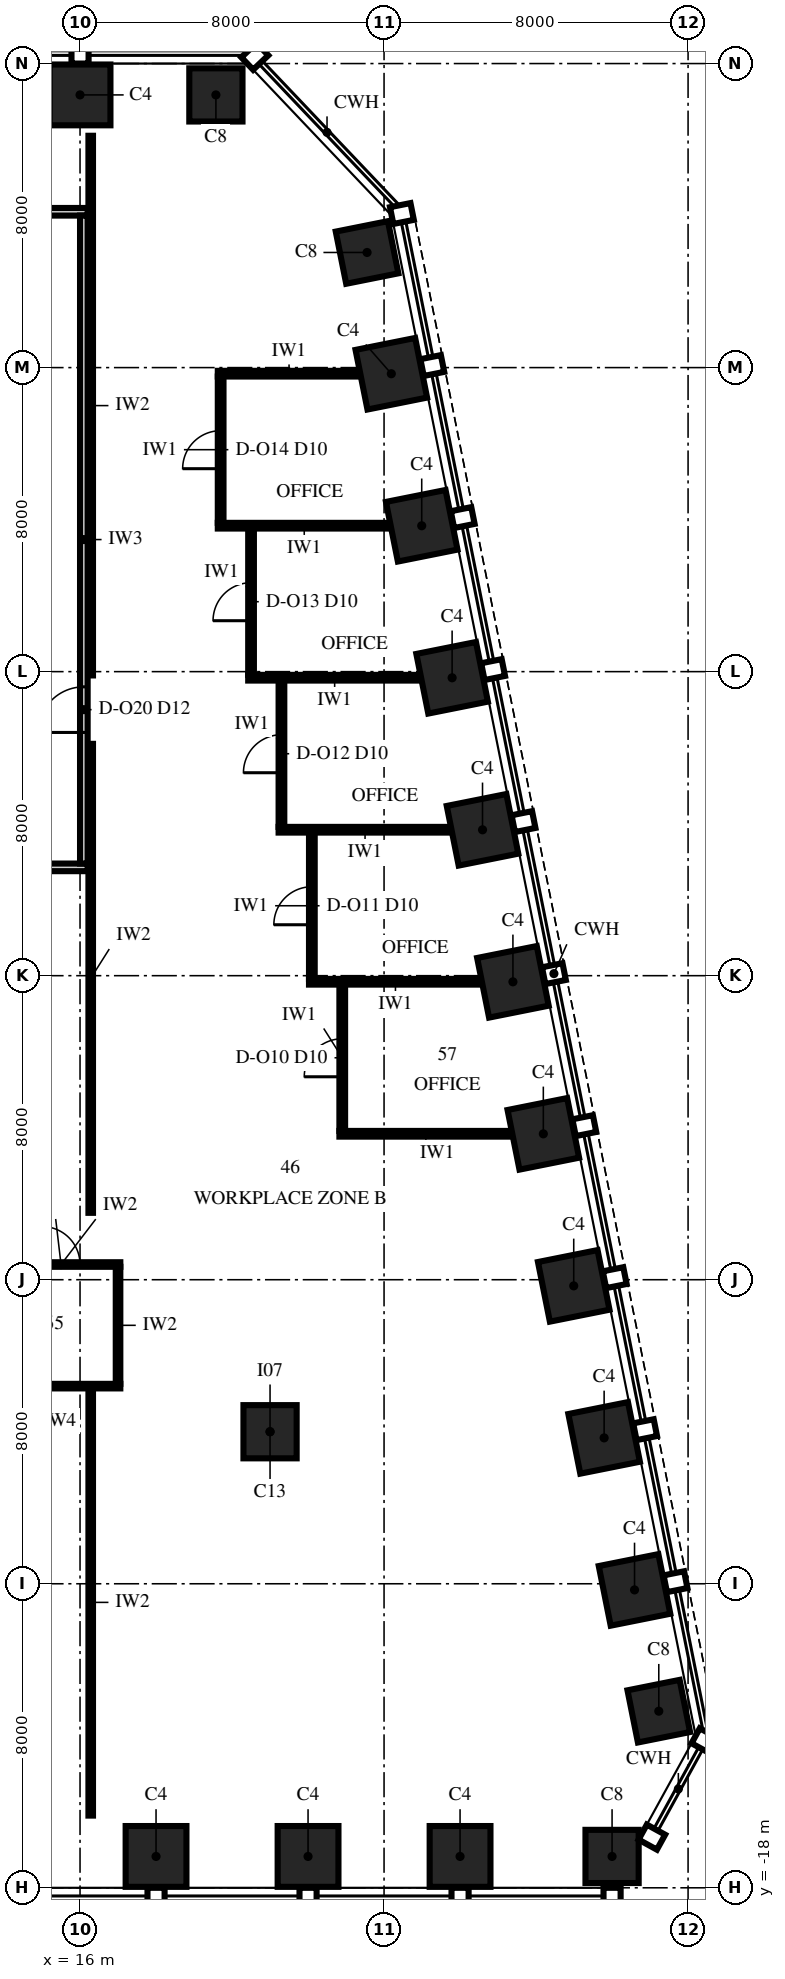
"""IFC4 building model, lengths in metres.
Left out: names, types, materials, properties, quantities, classifications, styles, units other than length and angle.
Written with IfcOpenShell. Run it as: python <this file> out.ifc"""

import sys

from ifc_helpers import new_model, si_unit, direction, frame, frame_2d, origin, origin_2d, place, context, subcontext, project, spatial, rectangle, extrude, element, fill, save


model = new_model("IFC4")
c1 = context("Model", 3, precision=1e-05, world=origin(), true_north=direction((0.0, 1.0)))
c2 = subcontext(c1, "Body", "Model", "MODEL_VIEW")
j1 = project(units=[si_unit("LENGTHUNIT", "METRE"), si_unit("PLANEANGLEUNIT", "RADIAN")], contexts=[c1])
p1 = place(None, origin())
s1 = spatial("IfcSite", under=j1, at=p1, CompositionType="ELEMENT")
p2 = place(p1, origin())
s2 = spatial("IfcBuilding", under=s1, at=p2, CompositionType="ELEMENT")
p3 = place(p2, frame((0.0, 0.0, 190.0)))
s3 = spatial("IfcBuildingStorey", under=s2, at=p3, CompositionType="ELEMENT", Elevation=190.0)
for number, where, z_axis, x_axis in (
    (1, (18.0, -17.175, 0.0), (0.0, 0.0, 1.0), (1.0, 0.0, 0.0)),
    (2, (22.0, -17.175, 0.0), (0.0, 0.0, 1.0), (1.0, 0.0, 0.0)),
    (3, (26.0, -17.175, 0.0), (0.0, 0.0, 1.0), (1.0, 0.0, 0.0)),
):
    element("IfcColumn", number, at=place(p3, frame(where, z_axis=z_axis, x_axis=x_axis)), inside=s3, PredefinedType="COLUMN", context=c2, shape_type="SweptSolid", body=[
        extrude(rectangle(XDim=1.6, YDim=1.6, at=origin_2d()), origin(), (0.0, 0.0, 1.0), 4.0),
    ])
for number, where, z_axis, x_axis in (
    (4, (30.0, -17.175, 0.0), (0.0, 0.0, 1.0), (1.0, 0.0, 0.0)),
    (5, (31.229, -13.353, 0.0), (0.0, 0.0, 1.0), (-0.196, 0.981, 0.0)),
):
    element("IfcColumn", number, at=place(p3, frame(where, z_axis=z_axis, x_axis=x_axis)), inside=s3, PredefinedType="COLUMN", context=c2, shape_type="SweptSolid", body=[
        extrude(rectangle(XDim=1.4, YDim=1.4, at=origin_2d()), origin(), (0.0, 0.0, 1.0), 4.0),
    ])
for number, where, z_axis, x_axis in (
    (6, (30.591, -10.162, 0.0), (0.0, 0.0, 1.0), (-0.196, 0.981, 0.0)),
    (7, (29.791, -6.162, 0.0), (0.0, 0.0, 1.0), (-0.196, 0.981, 0.0)),
    (8, (28.991, -2.162, 0.0), (0.0, 0.0, 1.0), (-0.196, 0.981, 0.0)),
    (9, (28.191, 1.838, 0.0), (0.0, 0.0, 1.0), (-0.196, 0.981, 0.0)),
    (10, (27.391, 5.838, 0.0), (0.0, 0.0, 1.0), (-0.196, 0.981, 0.0)),
    (11, (26.591, 9.838, 0.0), (0.0, 0.0, 1.0), (-0.196, 0.981, 0.0)),
    (12, (25.791, 13.838, 0.0), (0.0, 0.0, 1.0), (-0.196, 0.981, 0.0)),
    (13, (24.991, 17.838, 0.0), (0.0, 0.0, 1.0), (-0.196, 0.981, 0.0)),
    (14, (24.191, 21.838, 0.0), (0.0, 0.0, 1.0), (-0.196, 0.981, 0.0)),
):
    element("IfcColumn", number, at=place(p3, frame(where, z_axis=z_axis, x_axis=x_axis)), inside=s3, PredefinedType="COLUMN", context=c2, shape_type="SweptSolid", body=[
        extrude(rectangle(XDim=1.6, YDim=1.6, at=origin_2d()), origin(), (0.0, 0.0, 1.0), 4.0),
    ])
for number, where, z_axis, x_axis in (
    (15, (23.553, 25.029, 0.0), (0.0, 0.0, 1.0), (-0.196, 0.981, 0.0)),
    (16, (19.575, 29.175, 0.0), (0.0, 0.0, 1.0), (-1.0, 0.0, 0.0)),
):
    element("IfcColumn", number, at=place(p3, frame(where, z_axis=z_axis, x_axis=x_axis)), inside=s3, PredefinedType="COLUMN", context=c2, shape_type="SweptSolid", body=[
        extrude(rectangle(XDim=1.4, YDim=1.4, at=origin_2d()), origin(), (0.0, 0.0, 1.0), 4.0),
    ])
p4 = place(p3, frame((16.0, 29.175, 0.0), z_axis=(0.0, 0.0, 1.0), x_axis=(-1.0, 0.0, 0.0)))
e17 = element("IfcColumn", 17, at=p4, inside=s3, PredefinedType="COLUMN", context=c2, shape_type="SweptSolid", body=[
    extrude(rectangle(XDim=1.6, YDim=1.6, at=origin_2d()), origin(), (0.0, 0.0, 1.0), 4.0),
])
p5 = place(p3, frame((21.0, -6.0, 0.0), z_axis=(0.0, 0.0, 1.0), x_axis=(1.0, 0.0, 0.0)))
e18 = element("IfcColumn", 18, at=p5, inside=s3, PredefinedType="COLUMN", context=c2, shape_type="SweptSolid", body=[
    extrude(rectangle(XDim=1.4, YDim=1.4, at=origin_2d()), origin(), (0.0, 0.0, 1.0), 4.0),
])
p6 = place(p3, frame((1.94, -4.8, 0.0), z_axis=(0.0, 0.0, 1.0), x_axis=(1.0, 0.0, 0.0)))
e19 = element("IfcWall", 19, at=p6, inside=s3, PredefinedType="PARTITIONING", context=c2, shape_type="SweptSolid", body=[
    extrude(rectangle(XDim=15.12, YDim=0.12, at=frame_2d((7.56, 0.0))), origin(), (0.0, 0.0, 1.0), 3.25),
])
p7 = place(p3, frame((13.94, -1.6, 0.0), z_axis=(0.0, 0.0, 1.0), x_axis=(1.0, 0.0, 0.0)))
e20 = element("IfcWall", 20, at=p7, inside=s3, PredefinedType="PARTITIONING", context=c2, shape_type="SweptSolid", body=[
    extrude(rectangle(XDim=3.12, YDim=0.12, at=frame_2d((1.56, 0.0))), origin(), (0.0, 0.0, 1.0), 3.25),
])
p8 = place(p7, frame((1.06, 0.0, 0.0)))
e21 = element("IfcOpeningElement", 21, at=p8, cuts=e20, PredefinedType="OPENING", context=c2, shape_type="SweptSolid", body=[
    extrude(rectangle(XDim=1.0, YDim=2.4, at=frame_2d((0.5, 1.2))), frame((0.0, 0.075, 0.0), z_axis=(0.0, -1.0, 0.0), x_axis=(1.0, 0.0, 0.0)), (0.0, 0.0, 1.0), 0.15),
])
p9 = place(p3, frame((22.825, 1.84, 0.0), z_axis=(0.0, 0.0, 1.0), x_axis=(1.0, 0.0, 0.0)))
e22 = element("IfcWall", 22, at=p9, inside=s3, PredefinedType="PARTITIONING", context=c2, shape_type="SweptSolid", body=[
    extrude(rectangle(XDim=4.55, YDim=0.15, at=frame_2d((2.275, 0.0))), origin(), (0.0, 0.0, 1.0), 3.25),
])
p10 = place(p3, frame((22.025, 5.84, 0.0), z_axis=(0.0, 0.0, 1.0), x_axis=(1.0, 0.0, 0.0)))
e23 = element("IfcWall", 23, at=p10, inside=s3, PredefinedType="PARTITIONING", context=c2, shape_type="SweptSolid", body=[
    extrude(rectangle(XDim=4.55, YDim=0.15, at=frame_2d((2.275, 0.0))), origin(), (0.0, 0.0, 1.0), 2.842),
])
p11 = place(p3, frame((14.18, 8.85, 0.0), z_axis=(0.0, 0.0, 1.0), x_axis=(1.0, 0.0, 0.0)))
e24 = element("IfcWall", 24, at=p11, inside=s3, PredefinedType="PARTITIONING", context=c2, shape_type="SweptSolid", body=[
    extrude(rectangle(XDim=2.02, YDim=0.2, at=frame_2d((1.01, 0.0))), origin(), (0.0, 0.0, 1.0), 3.85),
])
for number, where, z_axis, x_axis in (
    (25, (21.225, 9.84, 0.0), (0.0, 0.0, 1.0), (1.0, 0.0, 0.0)),
    (26, (20.425, 13.84, 0.0), (0.0, 0.0, 1.0), (1.0, 0.0, 0.0)),
    (27, (19.625, 17.84, 0.0), (0.0, 0.0, 1.0), (1.0, 0.0, 0.0)),
):
    element("IfcWall", number, at=place(p3, frame(where, z_axis=z_axis, x_axis=x_axis)), inside=s3, PredefinedType="PARTITIONING", context=c2, shape_type="SweptSolid", body=[
        extrude(rectangle(XDim=4.55, YDim=0.15, at=frame_2d((2.275, 0.0))), origin(), (0.0, 0.0, 1.0), 3.25),
    ])
p12 = place(p3, frame((19.625, 21.84, 0.0), z_axis=(0.0, 0.0, 1.0), x_axis=(1.0, 0.0, 0.0)))
e28 = element("IfcWall", 28, at=p12, inside=s3, PredefinedType="PARTITIONING", context=c2, shape_type="SweptSolid", body=[
    extrude(rectangle(XDim=3.75, YDim=0.15, at=frame_2d((1.875, 0.0))), origin(), (0.0, 0.0, 1.0), 3.25),
])
p13 = place(p3, frame((-16.2, 26.1, 0.0), z_axis=(0.0, 0.0, 1.0), x_axis=(1.0, 0.0, 0.0)))
e29 = element("IfcWall", 29, at=p13, inside=s3, PredefinedType="PARTITIONING", context=c2, shape_type="SweptSolid", body=[
    extrude(rectangle(XDim=32.4, YDim=0.2, at=frame_2d((16.2, 0.0))), origin(), (0.0, 0.0, 1.0), 3.4),
])
p14 = place(p3, frame((16.1, 8.95, 0.0), z_axis=(0.0, 0.0, 1.0), x_axis=(0.0, 1.0, 0.0)))
e30 = element("IfcWall", 30, at=p14, inside=s3, PredefinedType="PARTITIONING", context=c2, shape_type="SweptSolid", body=[
    extrude(rectangle(XDim=17.05, YDim=0.2, at=frame_2d((8.525, 0.0))), origin(), (0.0, 0.0, 1.0), 3.25),
])
p15 = place(p14, frame((3.45, 0.0, 0.0)))
e31 = element("IfcOpeningElement", 31, at=p15, cuts=e30, PredefinedType="OPENING", context=c2, shape_type="SweptSolid", body=[
    extrude(rectangle(XDim=1.2, YDim=2.4, at=frame_2d((0.6, 1.2))), frame((0.0, 0.115, 0.0), z_axis=(0.0, -1.0, 0.0), x_axis=(1.0, 0.0, 0.0)), (0.0, 0.0, 1.0), 0.23),
])
p16 = place(p3, frame((17.0, -4.74, 0.0), z_axis=(0.0, 0.0, 1.0), x_axis=(0.0, 1.0, 0.0)))
e32 = element("IfcWall", 32, at=p16, inside=s3, PredefinedType="PARTITIONING", context=c2, shape_type="SweptSolid", body=[
    extrude(rectangle(XDim=3.08, YDim=0.12, at=frame_2d((1.54, 0.0))), origin(), (0.0, 0.0, 1.0), 3.85),
])
p17 = place(p3, frame((19.7, 17.915, 0.0), z_axis=(0.0, 0.0, 1.0), x_axis=(0.0, 1.0, 0.0)))
e33 = element("IfcWall", 33, at=p17, inside=s3, PredefinedType="PARTITIONING", context=c2, shape_type="SweptSolid", body=[
    extrude(rectangle(XDim=3.85, YDim=0.15, at=frame_2d((1.925, 0.0))), origin(), (0.0, 0.0, 1.0), 3.25),
])
p18 = place(p17, frame((1.425, 0.0, 0.0)))
e34 = element("IfcOpeningElement", 34, at=p18, cuts=e33, PredefinedType="OPENING", context=c2, shape_type="SweptSolid", body=[
    extrude(rectangle(XDim=1.0, YDim=2.3, at=frame_2d((0.5, 1.15))), frame((0.0, 0.09, 0.0), z_axis=(0.0, -1.0, 0.0), x_axis=(1.0, 0.0, 0.0)), (0.0, 0.0, 1.0), 0.18),
])
p19 = place(p3, frame((20.5, 13.915, 0.0), z_axis=(0.0, 0.0, 1.0), x_axis=(0.0, 1.0, 0.0)))
e35 = element("IfcWall", 35, at=p19, inside=s3, PredefinedType="PARTITIONING", context=c2, shape_type="SweptSolid", body=[
    extrude(rectangle(XDim=3.85, YDim=0.15, at=frame_2d((1.925, 0.0))), origin(), (0.0, 0.0, 1.0), 3.25),
])
p20 = place(p19, frame((1.425, 0.0, 0.0)))
e36 = element("IfcOpeningElement", 36, at=p20, cuts=e35, PredefinedType="OPENING", context=c2, shape_type="SweptSolid", body=[
    extrude(rectangle(XDim=1.0, YDim=2.3, at=frame_2d((0.5, 1.15))), frame((0.0, 0.09, 0.0), z_axis=(0.0, -1.0, 0.0), x_axis=(1.0, 0.0, 0.0)), (0.0, 0.0, 1.0), 0.18),
])
p21 = place(p3, frame((21.3, 9.915, 0.0), z_axis=(0.0, 0.0, 1.0), x_axis=(0.0, 1.0, 0.0)))
e37 = element("IfcWall", 37, at=p21, inside=s3, PredefinedType="PARTITIONING", context=c2, shape_type="SweptSolid", body=[
    extrude(rectangle(XDim=3.85, YDim=0.15, at=frame_2d((1.925, 0.0))), origin(), (0.0, 0.0, 1.0), 3.85),
])
p22 = place(p21, frame((1.425, 0.0, 0.0)))
e38 = element("IfcOpeningElement", 38, at=p22, cuts=e37, PredefinedType="OPENING", context=c2, shape_type="SweptSolid", body=[
    extrude(rectangle(XDim=1.0, YDim=2.3, at=frame_2d((0.5, 1.15))), frame((0.0, 0.09, 0.0), z_axis=(0.0, -1.0, 0.0), x_axis=(1.0, 0.0, 0.0)), (0.0, 0.0, 1.0), 0.18),
])
p23 = place(p3, frame((22.1, 5.915, 0.0), z_axis=(0.0, 0.0, 1.0), x_axis=(0.0, 1.0, 0.0)))
e39 = element("IfcWall", 39, at=p23, inside=s3, PredefinedType="PARTITIONING", context=c2, shape_type="SweptSolid", body=[
    extrude(rectangle(XDim=3.85, YDim=0.15, at=frame_2d((1.925, 0.0))), origin(), (0.0, 0.0, 1.0), 2.842),
])
p24 = place(p23, frame((1.425, 0.0, 0.0)))
e40 = element("IfcOpeningElement", 40, at=p24, cuts=e39, PredefinedType="OPENING", context=c2, shape_type="SweptSolid", body=[
    extrude(rectangle(XDim=1.0, YDim=2.3, at=frame_2d((0.5, 1.15))), frame((0.0, 0.09, 0.0), z_axis=(0.0, -1.0, 0.0), x_axis=(1.0, 0.0, 0.0)), (0.0, 0.0, 1.0), 0.18),
])
p25 = place(p3, frame((22.9, 1.915, 0.0), z_axis=(0.0, 0.0, 1.0), x_axis=(0.0, 1.0, 0.0)))
e41 = element("IfcWall", 41, at=p25, inside=s3, PredefinedType="PARTITIONING", context=c2, shape_type="SweptSolid", body=[
    extrude(rectangle(XDim=3.85, YDim=0.15, at=frame_2d((1.925, 0.0))), origin(), (0.0, 0.0, 1.0), 3.85),
])
p26 = place(p25, frame((1.425, 0.0, 0.0)))
e42 = element("IfcOpeningElement", 42, at=p26, cuts=e41, PredefinedType="OPENING", context=c2, shape_type="SweptSolid", body=[
    extrude(rectangle(XDim=1.0, YDim=2.3, at=frame_2d((0.5, 1.15))), frame((0.0, 0.09, 0.0), z_axis=(0.0, -1.0, 0.0), x_axis=(1.0, 0.0, 0.0)), (0.0, 0.0, 1.0), 0.18),
])
p27 = place(p3, frame((16.281, -16.1, 0.0), z_axis=(0.0, 0.0, 1.0), x_axis=(0.0, 1.0, 0.0)))
e43 = element("IfcWall", 43, at=p27, inside=s3, PredefinedType="PARTITIONING", context=c2, shape_type="SweptSolid", body=[
    extrude(rectangle(XDim=11.22, YDim=0.12, at=frame_2d((5.61, 0.0))), origin(), (0.0, 0.0, 1.0), 2.842),
])
p28 = place(p3, frame((16.281, -0.24, 0.0), z_axis=(0.0, 0.0, 1.0), x_axis=(0.0, 1.0, 0.0)))
e44 = element("IfcWall", 44, at=p28, inside=s3, PredefinedType="PARTITIONING", context=c2, shape_type="SweptSolid", body=[
    extrude(rectangle(XDim=12.34, YDim=0.12, at=frame_2d((6.17, 0.0))), origin(), (0.0, 0.0, 1.0), 2.842),
])
p29 = place(p3, frame((16.281, 13.9, 0.0), z_axis=(0.0, 0.0, 1.0), x_axis=(0.0, 1.0, 0.0)))
e45 = element("IfcWall", 45, at=p29, inside=s3, PredefinedType="PARTITIONING", context=c2, shape_type="SweptSolid", body=[
    extrude(rectangle(XDim=14.2, YDim=0.12, at=frame_2d((7.1, 0.0))), origin(), (0.0, 0.0, 1.0), 3.25),
])
p30 = place(p26, origin())
e46 = element("IfcDoor", 46, at=p30, inside=s3, OperationType="SINGLE_SWING_LEFT", PredefinedType="DOOR", context=c2, shape_type="SweptSolid", body=[
    extrude(rectangle(XDim=1.0, YDim=2.3, at=frame_2d((0.5, 1.15))), frame((0.0, 0.075, 0.0), z_axis=(0.0, -1.0, 0.0), x_axis=(1.0, 0.0, 0.0)), (0.0, 0.0, 1.0), 0.149),
])
fill(e42, e46)
p31 = place(p24, origin())
e47 = element("IfcDoor", 47, at=p31, inside=s3, OperationType="SINGLE_SWING_LEFT", PredefinedType="DOOR", context=c2, shape_type="SweptSolid", body=[
    extrude(rectangle(XDim=1.0, YDim=2.3, at=frame_2d((0.5, 1.15))), frame((0.0, 0.075, 0.0), z_axis=(0.0, -1.0, 0.0), x_axis=(1.0, 0.0, 0.0)), (0.0, 0.0, 1.0), 0.149),
])
fill(e40, e47)
p32 = place(p22, origin())
e48 = element("IfcDoor", 48, at=p32, inside=s3, OperationType="SINGLE_SWING_LEFT", PredefinedType="DOOR", context=c2, shape_type="SweptSolid", body=[
    extrude(rectangle(XDim=1.0, YDim=2.3, at=frame_2d((0.5, 1.15))), frame((0.0, 0.075, 0.0), z_axis=(0.0, -1.0, 0.0), x_axis=(1.0, 0.0, 0.0)), (0.0, 0.0, 1.0), 0.149),
])
fill(e38, e48)
p33 = place(p20, origin())
e49 = element("IfcDoor", 49, at=p33, inside=s3, OperationType="SINGLE_SWING_LEFT", PredefinedType="DOOR", context=c2, shape_type="SweptSolid", body=[
    extrude(rectangle(XDim=1.0, YDim=2.3, at=frame_2d((0.5, 1.15))), frame((0.0, 0.075, 0.0), z_axis=(0.0, -1.0, 0.0), x_axis=(1.0, 0.0, 0.0)), (0.0, 0.0, 1.0), 0.149),
])
fill(e36, e49)
p34 = place(p18, origin())
e50 = element("IfcDoor", 50, at=p34, inside=s3, OperationType="SINGLE_SWING_LEFT", PredefinedType="DOOR", context=c2, shape_type="SweptSolid", body=[
    extrude(rectangle(XDim=1.0, YDim=2.3, at=frame_2d((0.5, 1.15))), frame((0.0, 0.075, 0.0), z_axis=(0.0, -1.0, 0.0), x_axis=(1.0, 0.0, 0.0)), (0.0, 0.0, 1.0), 0.149),
])
fill(e34, e50)
p35 = place(p8, origin())
e51 = element("IfcDoor", 51, at=p35, inside=s3, OperationType="SINGLE_SWING_RIGHT", PredefinedType="DOOR", context=c2, shape_type="SweptSolid", body=[
    extrude(rectangle(XDim=1.0, YDim=2.4, at=frame_2d((0.5, 1.2))), frame((0.0, 0.06, 0.0), z_axis=(0.0, -1.0, 0.0), x_axis=(1.0, 0.0, 0.0)), (0.0, 0.0, 1.0), 0.12),
])
fill(e21, e51)
p36 = place(p15, origin())
e52 = element("IfcDoor", 52, at=p36, inside=s3, OperationType="SINGLE_SWING_LEFT", PredefinedType="DOOR", context=c2, shape_type="SweptSolid", body=[
    extrude(rectangle(XDim=1.2, YDim=2.4, at=frame_2d((0.6, 1.2))), frame((0.0, 0.1, 0.0), z_axis=(0.0, -1.0, 0.0), x_axis=(1.0, 0.0, 0.0)), (0.0, 0.0, 1.0), 0.199),
])
fill(e31, e52)
save(model, sys.argv[1])
